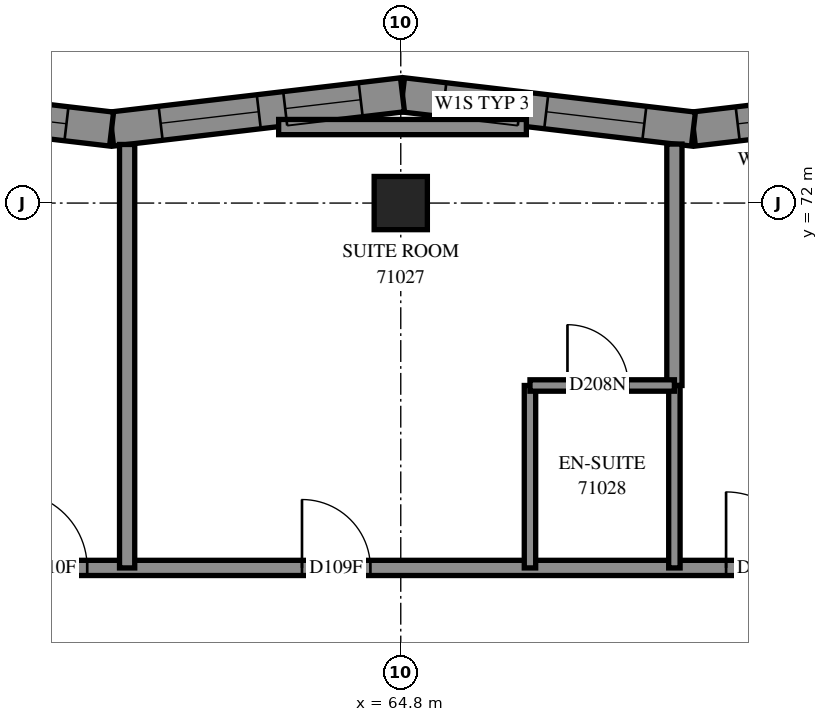
"""IFC4 building model, lengths in metres.
Left out: names, types, materials, properties, quantities, classifications, styles, units other than length and angle.
Written with IfcOpenShell. Run it as: python <this file> out.ifc"""

import sys

from ifc_helpers import new_model, si_unit, direction, frame, frame_2d, origin, origin_2d, place, context, subcontext, project, spatial, polyline, rectangle, outline, extrude, element, fill, save


model = new_model("IFC4")
c1 = context("Model", 3, precision=1e-05, world=origin(), true_north=direction((0.0, 1.0)))
c2 = subcontext(c1, "Body", "Model", "MODEL_VIEW")
j1 = project(units=[si_unit("LENGTHUNIT", "METRE"), si_unit("PLANEANGLEUNIT", "RADIAN")], contexts=[c1])
p1 = place(None, origin())
s1 = spatial("IfcSite", under=j1, at=p1, CompositionType="ELEMENT")
p2 = place(p1, origin())
s2 = spatial("IfcBuilding", under=s1, at=p2, CompositionType="ELEMENT")
p3 = place(p2, frame((0.0, 0.0, 260.8)))
s3 = spatial("IfcBuildingStorey", under=s2, at=p3, CompositionType="ELEMENT", Elevation=260.8)
p4 = place(p3, frame((64.8, 72.0, 0.0), z_axis=(0.0, 0.0, 1.0), x_axis=(1.0, 0.0, 0.0)))
e1 = element("IfcColumn", 1, at=p4, inside=s3, PredefinedType="COLUMN", context=c2, shape_type="SweptSolid", body=[
    extrude(rectangle(XDim=0.7, YDim=0.7, at=origin_2d()), origin(), (0.0, 0.0, 1.0), 3.1),
])
p5 = place(p3, frame((72.478, 73.424, 0.0), z_axis=(0.0, 0.0, 1.0), x_axis=(-0.9931289789, -0.1170249176, 0.0)))
e2 = element("IfcWall", 2, at=p5, inside=s3, PredefinedType="SOLIDWALL", context=c2, shape_type="SweptSolid", body=[
    extrude(outline(polyline([(-0.026, -0.225), (3.827, -0.225), (3.88, 0.225), (0.026, 0.225), (-0.026, -0.225)])), origin(), (0.0, 0.0, 1.0), 3.1),
])
p6 = place(p5, frame((0.718, 0.0, 0.45)))
e3 = element("IfcOpeningElement", 3, at=p6, cuts=e2, PredefinedType="OPENING", context=c2, shape_type="SweptSolid", body=[
    extrude(rectangle(XDim=0.8, YDim=2.5, at=frame_2d((0.4, 1.25))), frame((0.0, 0.235, 0.0), z_axis=(0.0, -1.0, 0.0), x_axis=(1.0, 0.0, 0.0)), (0.0, 0.0, 1.0), 0.47),
])
p7 = place(p5, frame((1.968, 0.0, 0.45)))
e4 = element("IfcOpeningElement", 4, at=p7, cuts=e2, PredefinedType="OPENING", context=c2, shape_type="SweptSolid", body=[
    extrude(rectangle(XDim=1.3, YDim=2.5, at=frame_2d((0.65, 1.25))), frame((0.0, 0.235, 0.0), z_axis=(0.0, -1.0, 0.0), x_axis=(1.0, 0.0, 0.0)), (0.0, 0.0, 1.0), 0.47),
])
p8 = place(p3, frame((68.65, 72.973, 0.0), z_axis=(0.0, 0.0, 1.0), x_axis=(-0.9931289789, 0.1170249176, 0.0)))
e5 = element("IfcWall", 5, at=p8, inside=s3, PredefinedType="SOLIDWALL", context=c2, shape_type="SweptSolid", body=[
    extrude(outline(polyline([(0.026, -0.225), (3.88, -0.225), (3.827, 0.225), (-0.026, 0.225), (0.026, -0.225)])), origin(), (0.0, 0.0, 1.0), 3.1),
])
p9 = place(p8, frame((0.65, 0.0, 0.45)))
e6 = element("IfcOpeningElement", 6, at=p9, cuts=e5, PredefinedType="OPENING", context=c2, shape_type="SweptSolid", body=[
    extrude(rectangle(XDim=1.3, YDim=2.5, at=frame_2d((0.65, 1.25))), frame((0.0, 0.235, 0.0), z_axis=(0.0, -1.0, 0.0), x_axis=(1.0, 0.0, 0.0)), (0.0, 0.0, 1.0), 0.47),
])
p10 = place(p8, frame((2.3, 0.0, 0.45)))
e7 = element("IfcOpeningElement", 7, at=p10, cuts=e5, PredefinedType="OPENING", context=c2, shape_type="SweptSolid", body=[
    extrude(rectangle(XDim=1.0, YDim=2.5, at=frame_2d((0.5, 1.25))), frame((0.0, 0.235, 0.0), z_axis=(0.0, -1.0, 0.0), x_axis=(1.0, 0.0, 0.0)), (0.0, 0.0, 1.0), 0.47),
])
p11 = place(p3, frame((64.823, 73.424, 0.0), z_axis=(0.0, 0.0, 1.0), x_axis=(-0.9931289789, -0.1170249176, 0.0)))
e8 = element("IfcWall", 8, at=p11, inside=s3, PredefinedType="SOLIDWALL", context=c2, shape_type="SweptSolid", body=[
    extrude(outline(polyline([(-0.026, -0.225), (3.827, -0.225), (3.88, 0.225), (0.026, 0.225), (-0.026, -0.225)])), origin(), (0.0, 0.0, 1.0), 3.1),
])
p12 = place(p11, frame((0.554, 0.0, 0.45)))
e9 = element("IfcOpeningElement", 9, at=p12, cuts=e8, PredefinedType="OPENING", context=c2, shape_type="SweptSolid", body=[
    extrude(rectangle(XDim=1.0, YDim=2.5, at=frame_2d((0.5, 1.25))), frame((0.0, 0.235, 0.0), z_axis=(0.0, -1.0, 0.0), x_axis=(1.0, 0.0, 0.0)), (0.0, 0.0, 1.0), 0.47),
])
p13 = place(p11, frame((1.904, 0.0, 0.45)))
e10 = element("IfcOpeningElement", 10, at=p13, cuts=e8, PredefinedType="OPENING", context=c2, shape_type="SweptSolid", body=[
    extrude(rectangle(XDim=1.3, YDim=2.5, at=frame_2d((0.65, 1.25))), frame((0.0, 0.235, 0.0), z_axis=(0.0, -1.0, 0.0), x_axis=(1.0, 0.0, 0.0)), (0.0, 0.0, 1.0), 0.47),
])
p14 = place(p3, frame((60.995, 72.973, 0.0), z_axis=(0.0, 0.0, 1.0), x_axis=(-0.9931289789, 0.1170249176, 0.0)))
e11 = element("IfcWall", 11, at=p14, inside=s3, PredefinedType="SOLIDWALL", context=c2, shape_type="SweptSolid", body=[
    extrude(outline(polyline([(0.026, -0.225), (3.88, -0.225), (3.827, 0.225), (-0.026, 0.225), (0.026, -0.225)])), origin(), (0.0, 0.0, 1.0), 3.1),
])
p15 = place(p14, frame((0.598, 0.0, 0.45)))
e12 = element("IfcOpeningElement", 12, at=p15, cuts=e11, PredefinedType="OPENING", context=c2, shape_type="SweptSolid", body=[
    extrude(rectangle(XDim=1.3, YDim=2.5, at=frame_2d((0.65, 1.25))), frame((0.0, 0.235, 0.0), z_axis=(0.0, -1.0, 0.0), x_axis=(1.0, 0.0, 0.0)), (0.0, 0.0, 1.0), 0.47),
])
p16 = place(p14, frame((2.348, 0.0, 0.45)))
e13 = element("IfcOpeningElement", 13, at=p16, cuts=e11, PredefinedType="OPENING", context=c2, shape_type="SweptSolid", body=[
    extrude(rectangle(XDim=0.8, YDim=2.5, at=frame_2d((0.4, 1.25))), frame((0.0, 0.235, 0.0), z_axis=(0.0, -1.0, 0.0), x_axis=(1.0, 0.0, 0.0)), (0.0, 0.0, 1.0), 0.47),
])
p17 = place(p3, frame((55.2, 67.2, 0.0), z_axis=(0.0, 0.0, 1.0), x_axis=(1.0, 0.0, 0.0)))
e14 = element("IfcWall", 14, at=p17, inside=s3, PredefinedType="PARTITIONING", context=c2, shape_type="SweptSolid", body=[
    extrude(rectangle(XDim=19.2, YDim=0.2, at=frame_2d((9.6, 0.0))), origin(), (0.0, 0.0, 1.0), 3.1),
])
p18 = place(p17, frame((4.475, 0.0, 0.0)))
e15 = element("IfcOpeningElement", 15, at=p18, cuts=e14, PredefinedType="OPENING", context=c2, shape_type="SweptSolid", body=[
    extrude(rectangle(XDim=1.0, YDim=2.1, at=frame_2d((0.5, 1.05))), frame((0.0, 0.11, 0.0), z_axis=(0.0, -1.0, 0.0), x_axis=(1.0, 0.0, 0.0)), (0.0, 0.0, 1.0), 0.22),
])
p19 = place(p17, frame((8.301, 0.0, 0.0)))
e16 = element("IfcOpeningElement", 16, at=p19, cuts=e14, PredefinedType="OPENING", context=c2, shape_type="SweptSolid", body=[
    extrude(rectangle(XDim=0.9, YDim=2.1, at=frame_2d((0.45, 1.05))), frame((0.0, 0.11, 0.0), z_axis=(0.0, -1.0, 0.0), x_axis=(1.0, 0.0, 0.0)), (0.0, 0.0, 1.0), 0.22),
])
p20 = place(p17, frame((13.88, 0.0, 0.0)))
e17 = element("IfcOpeningElement", 17, at=p20, cuts=e14, PredefinedType="OPENING", context=c2, shape_type="SweptSolid", body=[
    extrude(rectangle(XDim=1.0, YDim=2.1, at=frame_2d((0.5, 1.05))), frame((0.0, 0.11, 0.0), z_axis=(0.0, -1.0, 0.0), x_axis=(1.0, 0.0, 0.0)), (0.0, 0.0, 1.0), 0.22),
])
p21 = place(p3, frame((61.2, 67.2, 0.0), z_axis=(0.0, 0.0, 1.0), x_axis=(0.0, 1.0, 0.0)))
e18 = element("IfcWall", 18, at=p21, inside=s3, PredefinedType="PARTITIONING", context=c2, shape_type="SweptSolid", body=[
    extrude(rectangle(XDim=5.571, YDim=0.2, at=frame_2d((2.785, 0.0))), origin(), (0.0, 0.0, 1.0), 3.1),
])
p22 = place(p3, frame((63.194, 73.0, 0.0), z_axis=(0.0, 0.0, 1.0), x_axis=(1.0, 0.0, 0.0)))
e19 = element("IfcWall", 19, at=p22, inside=s3, PredefinedType="PARTITIONING", context=c2, shape_type="SweptSolid", body=[
    extrude(rectangle(XDim=3.259, YDim=0.2, at=frame_2d((1.629, 0.0))), origin(), (0.0, 0.0, 1.0), 3.1),
])
p23 = place(p3, frame((68.4, 69.6, 0.0), z_axis=(0.0, 0.0, 1.0), x_axis=(0.0, 1.0, 0.0)))
e20 = element("IfcWall", 20, at=p23, inside=s3, PredefinedType="PARTITIONING", context=c2, shape_type="SweptSolid", body=[
    extrude(rectangle(XDim=3.176, YDim=0.2, at=frame_2d((1.588, 0.0))), origin(), (0.0, 0.0, 1.0), 3.1),
])
for number, where, z_axis, x_axis in (
    (21, (66.5, 67.2, 0.0), (0.0, 0.0, 1.0), (0.0, 1.0, 0.0)),
    (22, (68.4, 67.2, 0.0), (0.0, 0.0, 1.0), (0.0, 1.0, 0.0)),
):
    element("IfcWall", number, at=place(p3, frame(where, z_axis=z_axis, x_axis=x_axis)), inside=s3, PredefinedType="PARTITIONING", context=c2, shape_type="SweptSolid", body=[
        extrude(rectangle(XDim=2.4, YDim=0.15, at=frame_2d((1.2, 0.0))), origin(), (0.0, 0.0, 1.0), 3.1),
    ])
p24 = place(p3, frame((66.5, 69.6, 0.0), z_axis=(0.0, 0.0, 1.0), x_axis=(1.0, 0.0, 0.0)))
e23 = element("IfcWall", 23, at=p24, inside=s3, PredefinedType="PARTITIONING", context=c2, shape_type="SweptSolid", body=[
    extrude(rectangle(XDim=1.9, YDim=0.15, at=frame_2d((0.95, 0.0))), origin(), (0.0, 0.0, 1.0), 3.1),
])
p25 = place(p24, frame((0.493, 0.0, 0.0)))
e24 = element("IfcOpeningElement", 24, at=p25, cuts=e23, PredefinedType="OPENING", context=c2, shape_type="SweptSolid", body=[
    extrude(rectangle(XDim=0.8, YDim=2.1, at=frame_2d((0.4, 1.05))), frame((0.0, 0.085, 0.0), z_axis=(0.0, -1.0, 0.0), x_axis=(1.0, 0.0, 0.0)), (0.0, 0.0, 1.0), 0.17),
])
p26 = place(p18, origin())
e25 = element("IfcDoor", 25, at=p26, inside=s3, OperationType="SINGLE_SWING_RIGHT", PredefinedType="DOOR", context=c2, shape_type="SweptSolid", body=[
    extrude(rectangle(XDim=1.0, YDim=2.1, at=frame_2d((0.5, 1.05))), frame((0.0, 0.025, 0.0), z_axis=(0.0, -1.0, 0.0), x_axis=(1.0, 0.0, 0.0)), (0.0, 0.0, 1.0), 0.05),
])
fill(e15, e25)
p27 = place(p19, origin())
e26 = element("IfcDoor", 26, at=p27, inside=s3, OperationType="SINGLE_SWING_LEFT", PredefinedType="DOOR", context=c2, shape_type="SweptSolid", body=[
    extrude(rectangle(XDim=0.9, YDim=2.1, at=frame_2d((0.45, 1.05))), frame((0.0, 0.025, 0.0), z_axis=(0.0, -1.0, 0.0), x_axis=(1.0, 0.0, 0.0)), (0.0, 0.0, 1.0), 0.05),
])
fill(e16, e26)
p28 = place(p25, origin())
e27 = element("IfcDoor", 27, at=p28, inside=s3, OperationType="SINGLE_SWING_RIGHT", PredefinedType="DOOR", context=c2, shape_type="SweptSolid", body=[
    extrude(rectangle(XDim=0.8, YDim=2.1, at=frame_2d((0.4, 1.05))), frame((0.0, 0.025, 0.0), z_axis=(0.0, -1.0, 0.0), x_axis=(1.0, 0.0, 0.0)), (0.0, 0.0, 1.0), 0.05),
])
fill(e24, e27)
p29 = place(p20, origin())
e28 = element("IfcDoor", 28, at=p29, inside=s3, OperationType="SINGLE_SWING_LEFT", PredefinedType="DOOR", context=c2, shape_type="SweptSolid", body=[
    extrude(rectangle(XDim=1.0, YDim=2.1, at=frame_2d((0.5, 1.05))), frame((0.0, 0.025, 0.0), z_axis=(0.0, -1.0, 0.0), x_axis=(1.0, 0.0, 0.0)), (0.0, 0.0, 1.0), 0.05),
])
fill(e17, e28)
p30 = place(p7, origin())
e29 = element("IfcWindow", 29, at=p30, inside=s3, PartitioningType="SINGLE_PANEL", PredefinedType="WINDOW", context=c2, shape_type="SweptSolid", body=[
    extrude(rectangle(XDim=1.3, YDim=2.5, at=frame_2d((0.65, 1.25))), frame((0.0, 0.205, 0.0), z_axis=(0.0, -1.0, 0.0), x_axis=(1.0, 0.0, 0.0)), (0.0, 0.0, 1.0), 0.06),
])
fill(e4, e29)
p31 = place(p9, origin())
e30 = element("IfcWindow", 30, at=p31, inside=s3, PartitioningType="SINGLE_PANEL", PredefinedType="WINDOW", context=c2, shape_type="SweptSolid", body=[
    extrude(rectangle(XDim=1.3, YDim=2.5, at=frame_2d((0.65, 1.25))), frame((0.0, 0.205, 0.0), z_axis=(0.0, -1.0, 0.0), x_axis=(1.0, 0.0, 0.0)), (0.0, 0.0, 1.0), 0.06),
])
fill(e6, e30)
p32 = place(p10, origin())
e31 = element("IfcWindow", 31, at=p32, inside=s3, PartitioningType="SINGLE_PANEL", PredefinedType="WINDOW", context=c2, shape_type="SweptSolid", body=[
    extrude(rectangle(XDim=1.0, YDim=2.5, at=frame_2d((0.5, 1.25))), frame((0.0, 0.105, 0.0), z_axis=(0.0, -1.0, 0.0), x_axis=(1.0, 0.0, 0.0)), (0.0, 0.0, 1.0), 0.06),
])
fill(e7, e31)
p33 = place(p12, origin())
e32 = element("IfcWindow", 32, at=p33, inside=s3, PartitioningType="SINGLE_PANEL", PredefinedType="WINDOW", context=c2, shape_type="SweptSolid", body=[
    extrude(rectangle(XDim=1.0, YDim=2.5, at=frame_2d((0.5, 1.25))), frame((0.0, 0.105, 0.0), z_axis=(0.0, -1.0, 0.0), x_axis=(1.0, 0.0, 0.0)), (0.0, 0.0, 1.0), 0.06),
])
fill(e9, e32)
p34 = place(p13, origin())
e33 = element("IfcWindow", 33, at=p34, inside=s3, PartitioningType="SINGLE_PANEL", PredefinedType="WINDOW", context=c2, shape_type="SweptSolid", body=[
    extrude(rectangle(XDim=1.3, YDim=2.5, at=frame_2d((0.65, 1.25))), frame((0.0, 0.205, 0.0), z_axis=(0.0, -1.0, 0.0), x_axis=(1.0, 0.0, 0.0)), (0.0, 0.0, 1.0), 0.06),
])
fill(e10, e33)
p35 = place(p15, origin())
e34 = element("IfcWindow", 34, at=p35, inside=s3, PartitioningType="SINGLE_PANEL", PredefinedType="WINDOW", context=c2, shape_type="SweptSolid", body=[
    extrude(rectangle(XDim=1.3, YDim=2.5, at=frame_2d((0.65, 1.25))), frame((0.0, 0.205, 0.0), z_axis=(0.0, -1.0, 0.0), x_axis=(1.0, 0.0, 0.0)), (0.0, 0.0, 1.0), 0.06),
])
fill(e12, e34)
save(model, sys.argv[1])
